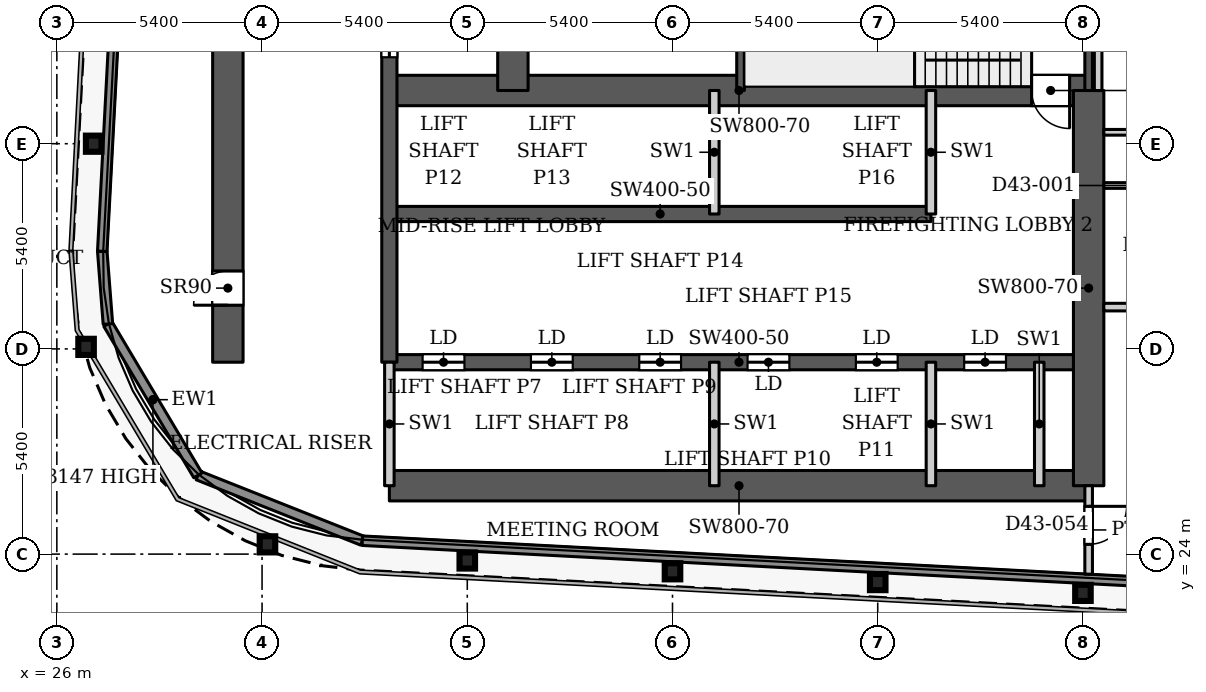
"""IFC4 building model, lengths in metres.
Left out: names, types, materials, properties, quantities, classifications, styles, units other than length and angle.
Written with IfcOpenShell. Run it as: python <this file> out.ifc"""

import sys

from ifc_helpers import new_model, si_unit, direction, frame, frame_2d, origin, origin_2d, place, context, subcontext, project, spatial, rectangle, i_section, extrude, source, transform, mapped, element, fill, save


model = new_model("IFC4")
c1 = context("Model", 3, precision=1e-05, world=origin(), true_north=direction((0.0, 1.0)))
c2 = subcontext(c1, "Body", "Model", "MODEL_VIEW")
j1 = project(units=[si_unit("LENGTHUNIT", "METRE"), si_unit("PLANEANGLEUNIT", "RADIAN")], contexts=[c1])
p1 = place(None, origin())
s1 = spatial("IfcSite", under=j1, at=p1, CompositionType="ELEMENT")
p2 = place(p1, origin())
s2 = spatial("IfcBuilding", under=s1, at=p2, CompositionType="ELEMENT")
p3 = place(p2, frame((0.0, 0.0, 191.6)))
s3 = spatial("IfcBuildingStorey", under=s2, at=p3, CompositionType="ELEMENT", Elevation=191.6)
for number, where, z_axis, x_axis in (
    (1, (53.0, 22.98, 0.0), (0.0, 0.0, 1.0), (1.0, 0.0, 0.0)),
    (2, (47.6, 23.264, 0.0), (0.0, 0.0, 1.0), (1.0, 0.0, 0.0)),
    (3, (42.2, 23.548, 0.0), (0.0, 0.0, 1.0), (1.0, 0.0, 0.0)),
    (4, (36.8, 23.832, 0.0), (0.0, 0.0, 1.0), (1.0, 0.0, 0.0)),
    (5, (31.542, 24.257, 0.0), (0.0, 0.0, 1.0), (1.0, 0.0, 0.0)),
    (6, (26.769, 29.454, 0.0), (0.0, 0.0, 1.0), (1.0, 0.0, 0.0)),
    (7, (26.969, 34.8, 0.0), (0.0, 0.0, 1.0), (1.0, 0.0, 0.0)),
):
    element("IfcColumn", number, at=place(p3, frame(where, z_axis=z_axis, x_axis=x_axis)), inside=s3, PredefinedType="COLUMN", context=c2, shape_type="SweptSolid", body=[
        extrude(i_section(OverallWidth=0.409, OverallDepth=0.425, WebThickness=0.033, FlangeThickness=0.052, FilletRadius=0.013, at=origin_2d()), origin(), (0.0, 0.0, 1.0), 3.9),
    ])
p4 = place(p3, frame((34.75, 25.8, 0.0), z_axis=(0.0, 0.0, 1.0), x_axis=(1.0, 0.0, 0.0)))
e8 = element("IfcWall", 8, at=p4, inside=s3, PredefinedType="SHEAR", context=c2, shape_type="SweptSolid", body=[
    extrude(rectangle(XDim=18.4, YDim=0.8, at=frame_2d((9.2, 0.0))), origin(), (0.0, 0.0, 1.0), 3.9),
])
p5 = place(p3, frame((34.75, 29.05, 0.0), z_axis=(0.0, 0.0, 1.0), x_axis=(1.0, 0.0, 0.0)))
e9 = element("IfcWall", 9, at=p5, inside=s3, PredefinedType="SHEAR", context=c2, shape_type="SweptSolid", body=[
    extrude(rectangle(XDim=18.4, YDim=0.4, at=frame_2d((9.2, 0.0))), origin(), (0.0, 0.0, 1.0), 3.9),
])
p6 = place(p5, frame((0.875, 0.0, 0.0)))
e10 = element("IfcOpeningElement", 10, at=p6, cuts=e9, PredefinedType="OPENING", context=c2, shape_type="SweptSolid", body=[
    extrude(rectangle(XDim=1.1, YDim=2.2, at=frame_2d((0.55, 1.1))), frame((0.0, 0.21, 0.0), z_axis=(0.0, -1.0, 0.0), x_axis=(1.0, 0.0, 0.0)), (0.0, 0.0, 1.0), 0.42),
])
p7 = place(p5, frame((3.725, 0.0, 0.0)))
e11 = element("IfcOpeningElement", 11, at=p7, cuts=e9, PredefinedType="OPENING", context=c2, shape_type="SweptSolid", body=[
    extrude(rectangle(XDim=1.1, YDim=2.2, at=frame_2d((0.55, 1.1))), frame((0.0, 0.21, 0.0), z_axis=(0.0, -1.0, 0.0), x_axis=(1.0, 0.0, 0.0)), (0.0, 0.0, 1.0), 0.42),
])
p8 = place(p5, frame((6.575, 0.0, 0.0)))
e12 = element("IfcOpeningElement", 12, at=p8, cuts=e9, PredefinedType="OPENING", context=c2, shape_type="SweptSolid", body=[
    extrude(rectangle(XDim=1.1, YDim=2.2, at=frame_2d((0.55, 1.1))), frame((0.0, 0.21, 0.0), z_axis=(0.0, -1.0, 0.0), x_axis=(1.0, 0.0, 0.0)), (0.0, 0.0, 1.0), 0.42),
])
p9 = place(p5, frame((9.425, 0.0, 0.0)))
e13 = element("IfcOpeningElement", 13, at=p9, cuts=e9, PredefinedType="OPENING", context=c2, shape_type="SweptSolid", body=[
    extrude(rectangle(XDim=1.1, YDim=2.2, at=frame_2d((0.55, 1.1))), frame((0.0, 0.21, 0.0), z_axis=(0.0, -1.0, 0.0), x_axis=(1.0, 0.0, 0.0)), (0.0, 0.0, 1.0), 0.42),
])
p10 = place(p5, frame((12.275, 0.0, 0.0)))
e14 = element("IfcOpeningElement", 14, at=p10, cuts=e9, PredefinedType="OPENING", context=c2, shape_type="SweptSolid", body=[
    extrude(rectangle(XDim=1.1, YDim=2.2, at=frame_2d((0.55, 1.1))), frame((0.0, 0.21, 0.0), z_axis=(0.0, -1.0, 0.0), x_axis=(1.0, 0.0, 0.0)), (0.0, 0.0, 1.0), 0.42),
])
p11 = place(p5, frame((15.125, 0.0, 0.0)))
e15 = element("IfcOpeningElement", 15, at=p11, cuts=e9, PredefinedType="OPENING", context=c2, shape_type="SweptSolid", body=[
    extrude(rectangle(XDim=1.1, YDim=2.2, at=frame_2d((0.55, 1.1))), frame((0.0, 0.21, 0.0), z_axis=(0.0, -1.0, 0.0), x_axis=(1.0, 0.0, 0.0)), (0.0, 0.0, 1.0), 0.42),
])
p12 = place(p3, frame((34.75, 32.95, 0.0), z_axis=(0.0, 0.0, 1.0), x_axis=(1.0, 0.0, 0.0)))
e16 = element("IfcWall", 16, at=p12, inside=s3, PredefinedType="SHEAR", context=c2, shape_type="SweptSolid", body=[
    extrude(rectangle(XDim=14.25, YDim=0.4, at=frame_2d((7.125, 0.0))), origin(), (0.0, 0.0, 1.0), 3.9),
])
p13 = place(p3, frame((34.75, 36.2, 0.0), z_axis=(0.0, 0.0, 1.0), x_axis=(1.0, 0.0, 0.0)))
e17 = element("IfcWall", 17, at=p13, inside=s3, PredefinedType="SHEAR", context=c2, shape_type="SweptSolid", body=[
    extrude(rectangle(XDim=18.4, YDim=0.8, at=frame_2d((9.2, 0.0))), origin(), (0.0, 0.0, 1.0), 3.9),
])
p14 = place(p13, frame((16.9, 0.0, 0.0)))
e18 = element("IfcOpeningElement", 18, at=p14, cuts=e17, PredefinedType="OPENING", context=c2, shape_type="SweptSolid", body=[
    extrude(rectangle(XDim=1.0, YDim=2.2, at=frame_2d((0.5, 1.1))), frame((0.0, 0.41, 0.0), z_axis=(0.0, -1.0, 0.0), x_axis=(1.0, 0.0, 0.0)), (0.0, 0.0, 1.0), 0.82),
])
p15 = place(p3, frame((34.75, 29.05, 0.0), z_axis=(0.0, 0.0, 1.0), x_axis=(0.0, 1.0, 0.0)))
e19 = element("IfcWall", 19, at=p15, inside=s3, PredefinedType="SHEAR", context=c2, shape_type="SweptSolid", body=[
    extrude(rectangle(XDim=18.45, YDim=0.4, at=frame_2d((9.225, 0.0))), origin(), (0.0, 0.0, 1.0), 3.9),
])
p16 = place(p15, frame((8.025, 0.0, 0.0)))
e20 = element("IfcOpeningElement", 20, at=p16, cuts=e19, PredefinedType="OPENING", context=c2, shape_type="SweptSolid", body=[
    extrude(rectangle(XDim=1.1, YDim=2.2, at=frame_2d((0.55, 1.1))), frame((0.0, 0.21, 0.0), z_axis=(0.0, -1.0, 0.0), x_axis=(1.0, 0.0, 0.0)), (0.0, 0.0, 1.0), 0.42),
])
p17 = place(p15, frame((10.875, 0.0, 0.0)))
e21 = element("IfcOpeningElement", 21, at=p17, cuts=e19, PredefinedType="OPENING", context=c2, shape_type="SweptSolid", body=[
    extrude(rectangle(XDim=1.1, YDim=2.2, at=frame_2d((0.55, 1.1))), frame((0.0, 0.21, 0.0), z_axis=(0.0, -1.0, 0.0), x_axis=(1.0, 0.0, 0.0)), (0.0, 0.0, 1.0), 0.42),
])
p18 = place(p15, frame((13.725, 0.0, 0.0)))
e22 = element("IfcOpeningElement", 22, at=p18, cuts=e19, PredefinedType="OPENING", context=c2, shape_type="SweptSolid", body=[
    extrude(rectangle(XDim=1.1, YDim=2.2, at=frame_2d((0.55, 1.1))), frame((0.0, 0.21, 0.0), z_axis=(0.0, -1.0, 0.0), x_axis=(1.0, 0.0, 0.0)), (0.0, 0.0, 1.0), 0.42),
])
p19 = place(p15, frame((15.95, 0.0, 0.0)))
e23 = element("IfcOpeningElement", 23, at=p19, cuts=e19, PredefinedType="OPENING", context=c2, shape_type="SweptSolid", body=[
    extrude(rectangle(XDim=1.1, YDim=2.2, at=frame_2d((0.55, 1.1))), frame((0.0, 0.21, 0.0), z_axis=(0.0, -1.0, 0.0), x_axis=(1.0, 0.0, 0.0)), (0.0, 0.0, 1.0), 0.42),
])
p20 = place(p3, frame((38.0, 36.2, 0.0), z_axis=(0.0, 0.0, 1.0), x_axis=(0.0, 1.0, 0.0)))
e24 = element("IfcWall", 24, at=p20, inside=s3, PredefinedType="SHEAR", context=c2, shape_type="SweptSolid", body=[
    extrude(rectangle(XDim=8.55, YDim=0.8, at=frame_2d((4.275, 0.0))), origin(), (0.0, 0.0, 1.0), 3.9),
])
p21 = place(p3, frame((30.5, 29.05, 0.0), z_axis=(0.0, 0.0, 1.0), x_axis=(0.0, 1.0, 0.0)))
e25 = element("IfcWall", 25, at=p21, inside=s3, PredefinedType="SHEAR", context=c2, shape_type="SweptSolid", body=[
    extrude(rectangle(XDim=18.45, YDim=0.8, at=frame_2d((9.225, 0.0))), origin(), (0.0, 0.0, 1.0), 3.9),
])
p22 = place(p21, frame((1.5, 0.0, 0.0)))
e26 = element("IfcOpeningElement", 26, at=p22, cuts=e25, PredefinedType="OPENING", context=c2, shape_type="SweptSolid", body=[
    extrude(rectangle(XDim=0.9, YDim=2.2, at=frame_2d((0.45, 1.1))), frame((0.0, 0.41, 0.0), z_axis=(0.0, -1.0, 0.0), x_axis=(1.0, 0.0, 0.0)), (0.0, 0.0, 1.0), 0.82),
])
p23 = place(p21, frame((8.705, 0.0, 0.0)))
e27 = element("IfcOpeningElement", 27, at=p23, cuts=e25, PredefinedType="OPENING", context=c2, shape_type="SweptSolid", body=[
    extrude(rectangle(XDim=0.9, YDim=2.2, at=frame_2d((0.45, 1.1))), frame((0.0, 0.41, 0.0), z_axis=(0.0, -1.0, 0.0), x_axis=(1.0, 0.0, 0.0)), (0.0, 0.0, 1.0), 0.82),
])
p24 = place(p3, frame((53.15, 25.8, 0.0), z_axis=(0.0, 0.0, 1.0), x_axis=(0.0, 1.0, 0.0)))
e28 = element("IfcWall", 28, at=p24, inside=s3, PredefinedType="SHEAR", context=c2, shape_type="SweptSolid", body=[
    extrude(rectangle(XDim=10.4, YDim=0.8, at=frame_2d((5.2, 0.0))), origin(), (0.0, 0.0, 1.0), 3.9),
])
p25 = place(p3, frame((34.039, 24.353, 0.0), z_axis=(0.0, 0.0, 1.0), x_axis=(-0.929352825399, 0.369192803184, 0.0)))
e29 = element("IfcWall", 29, at=p25, inside=s3, PredefinedType="SOLIDWALL", context=c2, shape_type="SweptSolid", body=[
    extrude(rectangle(XDim=4.656, YDim=0.25, at=frame_2d((2.328, 0.0))), origin(), (0.0, 0.0, 1.0), 3.75),
])
p26 = place(p3, frame((29.712, 26.072, 0.0), z_axis=(0.0, 0.0, 1.0), x_axis=(-0.511028049012, 0.859564036662, 0.0)))
e30 = element("IfcWall", 30, at=p26, inside=s3, PredefinedType="SOLIDWALL", context=c2, shape_type="SweptSolid", body=[
    extrude(rectangle(XDim=4.634, YDim=0.25, at=frame_2d((2.317, 0.0))), origin(), (0.0, 0.0, 1.0), 3.147),
])
p27 = place(p3, frame((27.344, 30.055, 0.0), z_axis=(0.0, 0.0, 1.0), x_axis=(-0.077571675317, 0.99698677784, 0.0)))
e31 = element("IfcWall", 31, at=p27, inside=s3, PredefinedType="SOLIDWALL", context=c2, shape_type="SweptSolid", body=[
    extrude(rectangle(XDim=1.92, YDim=0.25, at=frame_2d((0.96, 0.0))), origin(), (0.0, 0.0, 1.0), 3.75),
])
p28 = place(p3, frame((27.195, 31.969, 0.0), z_axis=(0.0, 0.0, 1.0), x_axis=(0.052554995867, 0.998618031286, 0.0)))
e32 = element("IfcWall", 32, at=p28, inside=s3, PredefinedType="SOLIDWALL", context=c2, shape_type="SweptSolid", body=[
    extrude(rectangle(XDim=66.787, YDim=0.25, at=frame_2d((33.394, 0.0))), origin(), (0.0, 0.0, 1.0), 3.75),
])
p29 = place(p3, frame((100.586, 20.85, 0.0), z_axis=(0.0, 0.0, 1.0), x_axis=(-0.99861746497, 0.052565755559, 0.0)))
e33 = element("IfcWall", 33, at=p29, inside=s3, PredefinedType="SOLIDWALL", context=c2, shape_type="SweptSolid", body=[
    extrude(rectangle(XDim=66.639, YDim=0.25, at=frame_2d((33.319, 0.0))), origin(), (0.0, 0.0, 1.0), 3.75),
])
for number, where, z_axis, x_axis in (
    (34, (43.99, 36.2, 0.0), (0.0, 0.0, 1.0), (0.0, 1.0, 0.0)),
    (35, (53.15, 36.2, 0.0), (0.0, 0.0, 1.0), (0.0, 1.0, 0.0)),
):
    element("IfcWall", number, at=place(p3, frame(where, z_axis=z_axis, x_axis=x_axis)), inside=s3, PredefinedType="SHEAR", context=c2, shape_type="SweptSolid", body=[
        extrude(rectangle(XDim=3.15, YDim=0.2, at=frame_2d((1.575, 0.0))), origin(), (0.0, 0.0, 1.0), 3.9),
    ])
for number, where, z_axis, x_axis in (
    (36, (34.75, 25.8, 0.0), (0.0, 0.0, 1.0), (0.0, 1.0, 0.0)),
    (37, (43.3, 25.8, 0.0), (0.0, 0.0, 1.0), (0.0, 1.0, 0.0)),
    (38, (43.3, 32.95, 0.0), (0.0, 0.0, 1.0), (0.0, 1.0, 0.0)),
    (39, (49.0, 25.8, 0.0), (0.0, 0.0, 1.0), (0.0, 1.0, 0.0)),
    (40, (49.0, 32.95, 0.0), (0.0, 0.0, 1.0), (0.0, 1.0, 0.0)),
    (41, (51.85, 25.8, 0.0), (0.0, 0.0, 1.0), (0.0, 1.0, 0.0)),
):
    element("IfcWall", number, at=place(p3, frame(where, z_axis=z_axis, x_axis=x_axis)), inside=s3, PredefinedType="PARTITIONING", context=c2, shape_type="SweptSolid", body=[
        extrude(rectangle(XDim=3.25, YDim=0.25, at=frame_2d((1.625, 0.0))), origin(), (0.0, 0.0, 1.0), 3.9),
    ])
p30 = place(p3, frame((53.15, 23.472, 0.0), z_axis=(0.0, 0.0, 1.0), x_axis=(0.0, 1.0, 0.0)))
e42 = element("IfcWall", 42, at=p30, inside=s3, PredefinedType="PARTITIONING", context=c2, shape_type="SweptSolid", body=[
    extrude(rectangle(XDim=2.328, YDim=0.2, at=frame_2d((1.164, 0.0))), origin(), (0.0, 0.0, 1.0), 3.6),
])
p31 = place(p30, frame((0.785, 0.0, 0.0)))
e43 = element("IfcOpeningElement", 43, at=p31, cuts=e42, PredefinedType="OPENING", context=c2, shape_type="SweptSolid", body=[
    extrude(rectangle(XDim=1.0, YDim=2.1, at=frame_2d((0.5, 1.05))), frame((0.0, 0.11, 0.0), z_axis=(0.0, -1.0, 0.0), x_axis=(1.0, 0.0, 0.0)), (0.0, 0.0, 1.0), 0.22),
])
p32 = place(p3, frame((53.4, 36.199, 0.0), z_axis=(0.0, 0.0, 1.0), x_axis=(0.0, 1.0, 0.0)))
e44 = element("IfcWall", 44, at=p32, inside=s3, PredefinedType="PARTITIONING", context=c2, shape_type="SweptSolid", body=[
    extrude(rectangle(XDim=7.701, YDim=0.2, at=frame_2d((3.851, 0.0))), origin(), (0.0, 0.0, 1.0), 3.6),
])
p33 = place(p3, frame((53.549, 30.5, 0.0), z_axis=(0.0, 0.0, 1.0), x_axis=(1.0, 0.0, 0.0)))
e45 = element("IfcWall", 45, at=p33, inside=s3, PredefinedType="PARTITIONING", context=c2, shape_type="SweptSolid", body=[
    extrude(rectangle(XDim=44.551, YDim=0.2, at=frame_2d((22.275, 0.0))), origin(), (0.0, 0.0, 1.0), 3.6),
])
p34 = place(p33, frame((8.351, 0.0, 0.0)))
e46 = element("IfcOpeningElement", 46, at=p34, cuts=e45, PredefinedType="OPENING", context=c2, shape_type="SweptSolid", body=[
    extrude(rectangle(XDim=1.0, YDim=2.1, at=frame_2d((0.5, 1.05))), frame((0.0, 0.11, 0.0), z_axis=(0.0, -1.0, 0.0), x_axis=(1.0, 0.0, 0.0)), (0.0, 0.0, 1.0), 0.22),
])
p35 = place(p33, frame((12.551, 0.0, 0.0)))
e47 = element("IfcOpeningElement", 47, at=p35, cuts=e45, PredefinedType="OPENING", context=c2, shape_type="SweptSolid", body=[
    extrude(rectangle(XDim=1.0, YDim=2.1, at=frame_2d((0.5, 1.05))), frame((0.0, 0.11, 0.0), z_axis=(0.0, -1.0, 0.0), x_axis=(1.0, 0.0, 0.0)), (0.0, 0.0, 1.0), 0.22),
])
p36 = place(p33, frame((28.751, 0.0, 0.0)))
e48 = element("IfcOpeningElement", 48, at=p36, cuts=e45, PredefinedType="OPENING", context=c2, shape_type="SweptSolid", body=[
    extrude(rectangle(XDim=1.0, YDim=2.1, at=frame_2d((0.5, 1.05))), frame((0.0, 0.11, 0.0), z_axis=(0.0, -1.0, 0.0), x_axis=(1.0, 0.0, 0.0)), (0.0, 0.0, 1.0), 0.22),
])
p37 = place(p33, frame((40.751, 0.0, 0.0)))
e49 = element("IfcOpeningElement", 49, at=p37, cuts=e45, PredefinedType="OPENING", context=c2, shape_type="SweptSolid", body=[
    extrude(rectangle(XDim=1.0, YDim=2.1, at=frame_2d((0.5, 1.05))), frame((0.0, 0.11, 0.0), z_axis=(0.0, -1.0, 0.0), x_axis=(1.0, 0.0, 0.0)), (0.0, 0.0, 1.0), 0.22),
])
p38 = place(p3, frame((53.549, 33.7, 0.0), z_axis=(0.0, 0.0, 1.0), x_axis=(1.0, 0.0, 0.0)))
e50 = element("IfcWall", 50, at=p38, inside=s3, PredefinedType="PARTITIONING", context=c2, shape_type="SweptSolid", body=[
    extrude(rectangle(XDim=7.701, YDim=0.15, at=frame_2d((3.851, 0.0))), origin(), (0.0, 0.0, 1.0), 3.6),
])
p39 = place(p38, frame((0.651, 0.0, 0.0)))
e51 = element("IfcOpeningElement", 51, at=p39, cuts=e50, PredefinedType="OPENING", context=c2, shape_type="SweptSolid", body=[
    extrude(rectangle(XDim=0.8, YDim=2.1, at=frame_2d((0.4, 1.05))), frame((0.0, 0.085, 0.0), z_axis=(0.0, -1.0, 0.0), x_axis=(1.0, 0.0, 0.0)), (0.0, 0.0, 1.0), 0.17),
])
p40 = place(p38, frame((5.401, 0.0, 0.0)))
e52 = element("IfcOpeningElement", 52, at=p40, cuts=e50, PredefinedType="OPENING", context=c2, shape_type="SweptSolid", body=[
    extrude(rectangle(XDim=0.9, YDim=2.1, at=frame_2d((0.45, 1.05))), frame((0.0, 0.085, 0.0), z_axis=(0.0, -1.0, 0.0), x_axis=(1.0, 0.0, 0.0)), (0.0, 0.0, 1.0), 0.17),
])
p41 = place(p38, frame((2.751, 0.0, 0.0)))
e53 = element("IfcOpeningElement", 53, at=p41, cuts=e50, PredefinedType="OPENING", context=c2, shape_type="SweptSolid", body=[
    extrude(rectangle(XDim=0.8, YDim=2.1, at=frame_2d((0.4, 1.05))), frame((0.0, 0.085, 0.0), z_axis=(0.0, -1.0, 0.0), x_axis=(1.0, 0.0, 0.0)), (0.0, 0.0, 1.0), 0.17),
])
p42 = place(p3, frame((53.549, 35.1, 0.0), z_axis=(0.0, 0.0, 1.0), x_axis=(1.0, 0.0, 0.0)))
e54 = element("IfcWall", 54, at=p42, inside=s3, PredefinedType="PARTITIONING", context=c2, shape_type="SweptSolid", body=[
    extrude(rectangle(XDim=11.751, YDim=0.15, at=frame_2d((5.875, 0.0))), origin(), (0.0, 0.0, 1.0), 3.6),
])
p43 = place(p42, frame((5.551, 0.0, 0.0)))
e55 = element("IfcOpeningElement", 55, at=p43, cuts=e54, PredefinedType="OPENING", context=c2, shape_type="SweptSolid", body=[
    extrude(rectangle(XDim=0.9, YDim=2.1, at=frame_2d((0.45, 1.05))), frame((0.0, 0.085, 0.0), z_axis=(0.0, -1.0, 0.0), x_axis=(1.0, 0.0, 0.0)), (0.0, 0.0, 1.0), 0.17),
])
p44 = place(p42, frame((1.751, 0.0, 0.0)))
e56 = element("IfcOpeningElement", 56, at=p44, cuts=e54, PredefinedType="OPENING", context=c2, shape_type="SweptSolid", body=[
    extrude(rectangle(XDim=1.0, YDim=2.1, at=frame_2d((0.5, 1.05))), frame((0.0, 0.085, 0.0), z_axis=(0.0, -1.0, 0.0), x_axis=(1.0, 0.0, 0.0)), (0.0, 0.0, 1.0), 0.17),
])
p45 = place(p42, frame((8.101, 0.0, 0.0)))
e57 = element("IfcOpeningElement", 57, at=p45, cuts=e54, PredefinedType="OPENING", context=c2, shape_type="SweptSolid", body=[
    extrude(rectangle(XDim=0.9, YDim=2.1, at=frame_2d((0.45, 1.05))), frame((0.0, 0.085, 0.0), z_axis=(0.0, -1.0, 0.0), x_axis=(1.0, 0.0, 0.0)), (0.0, 0.0, 1.0), 0.17),
])
m1 = source(origin(), c2, "Body", "SweptSolid", [
    extrude(rectangle(XDim=1.1, YDim=2.2, at=frame_2d((0.55, 1.1))), frame((0.0, 0.025, 0.0), z_axis=(0.0, -1.0, 0.0), x_axis=(1.0, 0.0, 0.0)), (0.0, 0.0, 1.0), 0.05),
])
p46 = place(p6, origin())
e58 = element("IfcDoor", 58, at=p46, inside=s3, OperationType="SLIDING_TO_LEFT", PredefinedType="DOOR", context=c2, shape_type="MappedRepresentation", body=[
    mapped(m1, transform((0.0, 0.0, 0.0), x_axis=(1.0, 0.0, 0.0), y_axis=(0.0, 1.0, 0.0), z_axis=(0.0, 0.0, 1.0), scale=1.0)),
])
fill(e10, e58)
p47 = place(p7, origin())
e59 = element("IfcDoor", 59, at=p47, inside=s3, OperationType="SLIDING_TO_LEFT", PredefinedType="DOOR", context=c2, shape_type="MappedRepresentation", body=[
    mapped(m1, transform((0.0, 0.0, 0.0), x_axis=(1.0, 0.0, 0.0), y_axis=(0.0, 1.0, 0.0), z_axis=(0.0, 0.0, 1.0), scale=1.0)),
])
fill(e11, e59)
p48 = place(p8, origin())
e60 = element("IfcDoor", 60, at=p48, inside=s3, OperationType="SLIDING_TO_LEFT", PredefinedType="DOOR", context=c2, shape_type="MappedRepresentation", body=[
    mapped(m1, transform((0.0, 0.0, 0.0), x_axis=(1.0, 0.0, 0.0), y_axis=(0.0, 1.0, 0.0), z_axis=(0.0, 0.0, 1.0), scale=1.0)),
])
fill(e12, e60)
p49 = place(p9, origin())
e61 = element("IfcDoor", 61, at=p49, inside=s3, OperationType="SLIDING_TO_LEFT", PredefinedType="DOOR", context=c2, shape_type="MappedRepresentation", body=[
    mapped(m1, transform((0.0, 0.0, 0.0), x_axis=(1.0, 0.0, 0.0), y_axis=(0.0, 1.0, 0.0), z_axis=(0.0, 0.0, 1.0), scale=1.0)),
])
fill(e13, e61)
p50 = place(p10, origin())
e62 = element("IfcDoor", 62, at=p50, inside=s3, OperationType="SLIDING_TO_LEFT", PredefinedType="DOOR", context=c2, shape_type="MappedRepresentation", body=[
    mapped(m1, transform((0.0, 0.0, 0.0), x_axis=(1.0, 0.0, 0.0), y_axis=(0.0, 1.0, 0.0), z_axis=(0.0, 0.0, 1.0), scale=1.0)),
])
fill(e14, e62)
p51 = place(p16, origin())
e63 = element("IfcDoor", 63, at=p51, inside=s3, OperationType="SLIDING_TO_LEFT", PredefinedType="DOOR", context=c2, shape_type="MappedRepresentation", body=[
    mapped(m1, transform((0.0, 0.0, 0.0), x_axis=(1.0, 0.0, 0.0), y_axis=(0.0, 1.0, 0.0), z_axis=(0.0, 0.0, 1.0), scale=1.0)),
])
fill(e20, e63)
p52 = place(p11, origin())
e64 = element("IfcDoor", 64, at=p52, inside=s3, OperationType="SLIDING_TO_LEFT", PredefinedType="DOOR", context=c2, shape_type="MappedRepresentation", body=[
    mapped(m1, transform((0.0, 0.0, 0.0), x_axis=(1.0, 0.0, 0.0), y_axis=(0.0, 1.0, 0.0), z_axis=(0.0, 0.0, 1.0), scale=1.0)),
])
fill(e15, e64)
m2 = source(origin(), c2, "Body", "SweptSolid", [
    extrude(rectangle(XDim=0.9, YDim=2.2, at=frame_2d((0.45, 1.1))), frame((0.0, 0.025, 0.0), z_axis=(0.0, -1.0, 0.0), x_axis=(1.0, 0.0, 0.0)), (0.0, 0.0, 1.0), 0.05),
])
p53 = place(p22, origin())
e65 = element("IfcDoor", 65, at=p53, inside=s3, OperationType="SINGLE_SWING_LEFT", PredefinedType="DOOR", context=c2, shape_type="MappedRepresentation", body=[
    mapped(m2, transform((0.0, 0.0, 0.0), x_axis=(1.0, 0.0, 0.0), y_axis=(0.0, 1.0, 0.0), z_axis=(0.0, 0.0, 1.0), scale=1.0)),
])
fill(e26, e65)
m3 = source(origin(), c2, "Body", "SweptSolid", [
    extrude(rectangle(XDim=1.0, YDim=2.2, at=frame_2d((0.5, 1.1))), frame((0.0, 0.025, 0.0), z_axis=(0.0, -1.0, 0.0), x_axis=(1.0, 0.0, 0.0)), (0.0, 0.0, 1.0), 0.05),
])
p54 = place(p14, origin())
e66 = element("IfcDoor", 66, at=p54, inside=s3, OperationType="SINGLE_SWING_RIGHT", PredefinedType="DOOR", context=c2, shape_type="MappedRepresentation", body=[
    mapped(m3, transform((0.0, 0.0, 0.0), x_axis=(1.0, 0.0, 0.0), y_axis=(0.0, 1.0, 0.0), z_axis=(0.0, 0.0, 1.0), scale=1.0)),
])
fill(e18, e66)
m4 = source(origin(), c2, "Body", "SweptSolid", [
    extrude(rectangle(XDim=1.0, YDim=2.1, at=frame_2d((0.5, 1.05))), frame((0.0, 0.025, 0.0), z_axis=(0.0, -1.0, 0.0), x_axis=(1.0, 0.0, 0.0)), (0.0, 0.0, 1.0), 0.05),
])
p55 = place(p31, origin())
e67 = element("IfcDoor", 67, at=p55, inside=s3, OperationType="SINGLE_SWING_RIGHT", PredefinedType="DOOR", context=c2, shape_type="MappedRepresentation", body=[
    mapped(m4, transform((0.0, 0.0, 0.0), x_axis=(1.0, 0.0, 0.0), y_axis=(0.0, 1.0, 0.0), z_axis=(0.0, 0.0, 1.0), scale=1.0)),
])
fill(e43, e67)
save(model, sys.argv[1])
